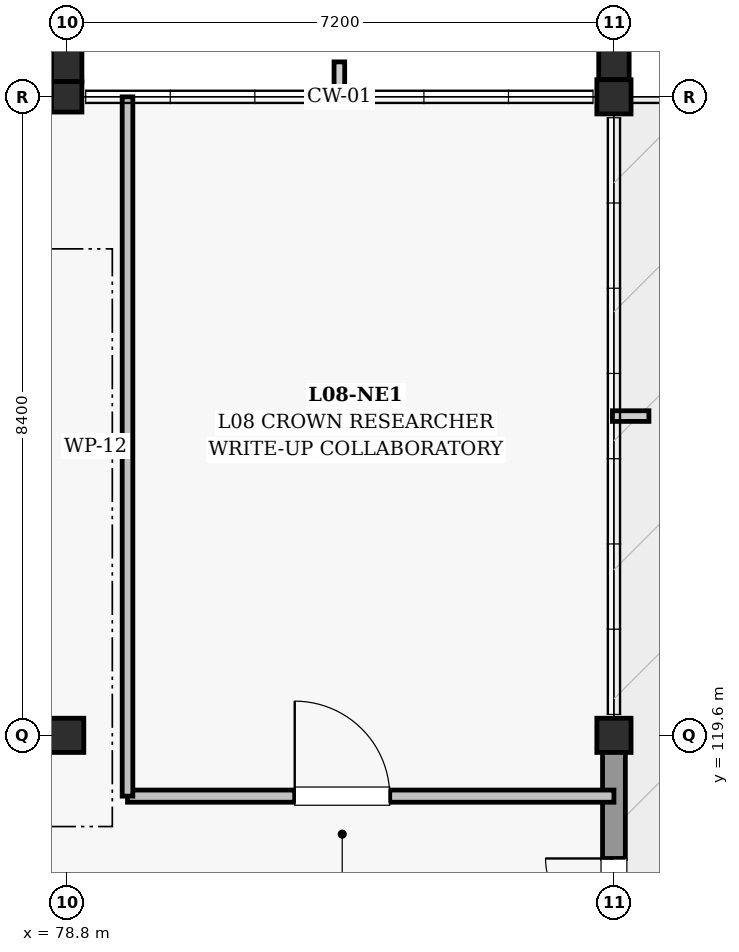
"""IFC4 building model, lengths in metres.
Left out: names, types, materials, properties, quantities, classifications, styles, units other than length and angle.
Written with IfcOpenShell. Run it as: python <this file> out.ifc"""

import sys

from ifc_helpers import new_model, si_unit, direction, frame, frame_2d, origin, origin_2d, place, context, subcontext, project, spatial, rectangle, extrude, element, fill, save


model = new_model("IFC4")
c1 = context("Model", 3, precision=1e-05, world=origin(), true_north=direction((0.0, 1.0)))
c2 = subcontext(c1, "Body", "Model", "MODEL_VIEW")
j1 = project(units=[si_unit("LENGTHUNIT", "METRE"), si_unit("PLANEANGLEUNIT", "RADIAN")], contexts=[c1])
p1 = place(None, origin())
s1 = spatial("IfcSite", under=j1, at=p1, CompositionType="ELEMENT")
p2 = place(p1, origin())
s2 = spatial("IfcBuilding", under=s1, at=p2, CompositionType="ELEMENT")
p3 = place(p2, frame((0.0, 0.0, 36.9)))
s3 = spatial("IfcBuildingStorey", under=s2, at=p3, CompositionType="ELEMENT", Elevation=36.9)
p4 = place(p3, frame((78.8, 119.6, 0.0), z_axis=(0.0, 0.0, 1.0), x_axis=(1.0, 0.0, 0.0)))
e1 = element("IfcColumn", 1, at=p4, inside=s3, PredefinedType="COLUMN", context=c2, shape_type="SweptSolid", body=[
    extrude(rectangle(XDim=0.45, YDim=0.45, at=origin_2d()), origin(), (0.0, 0.0, 1.0), 4.5),
])
p5 = place(p3, frame((78.8, 128.0, 0.0), z_axis=(0.0, 0.0, 1.0), x_axis=(1.0, 0.0, 0.0)))
e2 = element("IfcColumn", 2, at=p5, inside=s3, PredefinedType="COLUMN", context=c2, shape_type="SweptSolid", body=[
    extrude(rectangle(XDim=0.4, YDim=0.4, at=origin_2d()), origin(), (0.0, 0.0, 1.0), 4.5),
])
for number, where, z_axis, x_axis in (
    (3, (86.0, 119.6, 0.0), (0.0, 0.0, 1.0), (1.0, 0.0, 0.0)),
    (4, (86.0, 128.0, 0.0), (0.0, 0.0, 1.0), (1.0, 0.0, 0.0)),
):
    element("IfcColumn", number, at=place(p3, frame(where, z_axis=z_axis, x_axis=x_axis)), inside=s3, PredefinedType="COLUMN", context=c2, shape_type="SweptSolid", body=[
        extrude(rectangle(XDim=0.45, YDim=0.45, at=origin_2d()), origin(), (0.0, 0.0, 1.0), 4.5),
    ])
for number, where, z_axis, x_axis in (
    (5, (78.8, 128.503, 0.0), (0.0, 0.0, 1.0), (1.0, 0.0, 0.0)),
    (6, (86.0, 128.528, 0.0), (0.0, 0.0, 1.0), (1.0, 0.0, 0.0)),
):
    element("IfcColumn", number, at=place(p3, frame(where, z_axis=z_axis, x_axis=x_axis)), inside=s3, PredefinedType="PILASTER", context=c2, shape_type="SweptSolid", body=[
        extrude(rectangle(XDim=0.4, YDim=0.6, at=origin_2d()), origin(), (0.0, 0.0, 1.0), 4.5),
    ])
p6 = place(p3, frame((71.805, 128.0, 0.0), z_axis=(0.0, 0.0, 1.0), x_axis=(1.0, 0.0, 0.0)))
e7 = element("IfcWall", 7, at=p6, inside=s3, PredefinedType="SOLIDWALL", context=c2, shape_type="SweptSolid", body=[
    extrude(rectangle(XDim=6.815, YDim=0.32, at=frame_2d((3.408, 0.0))), origin(), (0.0, 0.0, 1.0), 2.955),
])
p7 = place(p3, frame((86.0, 111.38, 0.0), z_axis=(0.0, 0.0, 1.0), x_axis=(0.0, 1.0, 0.0)))
e8 = element("IfcWall", 8, at=p7, inside=s3, PredefinedType="SOLIDWALL", context=c2, shape_type="SweptSolid", body=[
    extrude(rectangle(XDim=8.015, YDim=0.3, at=frame_2d((4.008, 0.0))), origin(), (0.0, 0.0, 1.0), 2.955),
])
p8 = place(p7, frame((4.8, 0.0, 0.0)))
e9 = element("IfcOpeningElement", 9, at=p8, cuts=e8, PredefinedType="OPENING", context=c2, shape_type="SweptSolid", body=[
    extrude(rectangle(XDim=1.8, YDim=2.3, at=frame_2d((0.9, 1.15))), frame((0.0, 0.16, 0.0), z_axis=(0.0, -1.0, 0.0), x_axis=(1.0, 0.0, 0.0)), (0.0, 0.0, 1.0), 0.32),
])
p9 = place(p3, frame((79.6, 118.8, 0.0), z_axis=(0.0, 0.0, 1.0), x_axis=(1.0, 0.0, 0.0)))
e10 = element("IfcWall", 10, at=p9, inside=s3, PredefinedType="PARTITIONING", context=c2, shape_type="SweptSolid", body=[
    extrude(rectangle(XDim=6.4, YDim=0.16, at=frame_2d((3.2, 0.0))), origin(), (0.0, 0.0, 1.0), 3.31),
])
p10 = place(p9, frame((2.2, 0.0, 0.0)))
e11 = element("IfcOpeningElement", 11, at=p10, cuts=e10, PredefinedType="OPENING", context=c2, shape_type="SweptSolid", body=[
    extrude(rectangle(XDim=1.25, YDim=2.2, at=frame_2d((0.625, 1.1))), frame((0.0, 0.09, 0.0), z_axis=(0.0, -1.0, 0.0), x_axis=(1.0, 0.0, 0.0)), (0.0, 0.0, 1.0), 0.18),
])
p11 = place(p3, frame((79.6, 118.8, 0.0), z_axis=(0.0, 0.0, 1.0), x_axis=(0.0, 1.0, 0.0)))
e12 = element("IfcWall", 12, at=p11, inside=s3, PredefinedType="PARTITIONING", context=c2, shape_type="SweptSolid", body=[
    extrude(rectangle(XDim=9.2, YDim=0.14, at=frame_2d((4.6, 0.0))), origin(), (0.0, 0.0, 1.0), 3.51),
])
p12 = place(p8, origin())
e13 = element("IfcDoor", 13, at=p12, inside=s3, OperationType="DOUBLE_DOOR_SINGLE_SWING", PredefinedType="DOOR", context=c2, shape_type="SweptSolid", body=[
    extrude(rectangle(XDim=1.8, YDim=2.3, at=frame_2d((0.9, 1.15))), frame((0.0, 0.025, 0.0), z_axis=(0.0, -1.0, 0.0), x_axis=(1.0, 0.0, 0.0)), (0.0, 0.0, 1.0), 0.05),
])
fill(e9, e13)
p13 = place(p10, origin())
e14 = element("IfcDoor", 14, at=p13, inside=s3, OperationType="SINGLE_SWING_LEFT", PredefinedType="DOOR", context=c2, shape_type="SweptSolid", body=[
    extrude(rectangle(XDim=1.25, YDim=2.2, at=frame_2d((0.625, 1.1))), frame((0.0, 0.025, 0.0), z_axis=(0.0, -1.0, 0.0), x_axis=(1.0, 0.0, 0.0)), (0.0, 0.0, 1.0), 0.05),
])
fill(e11, e14)
save(model, sys.argv[1])
